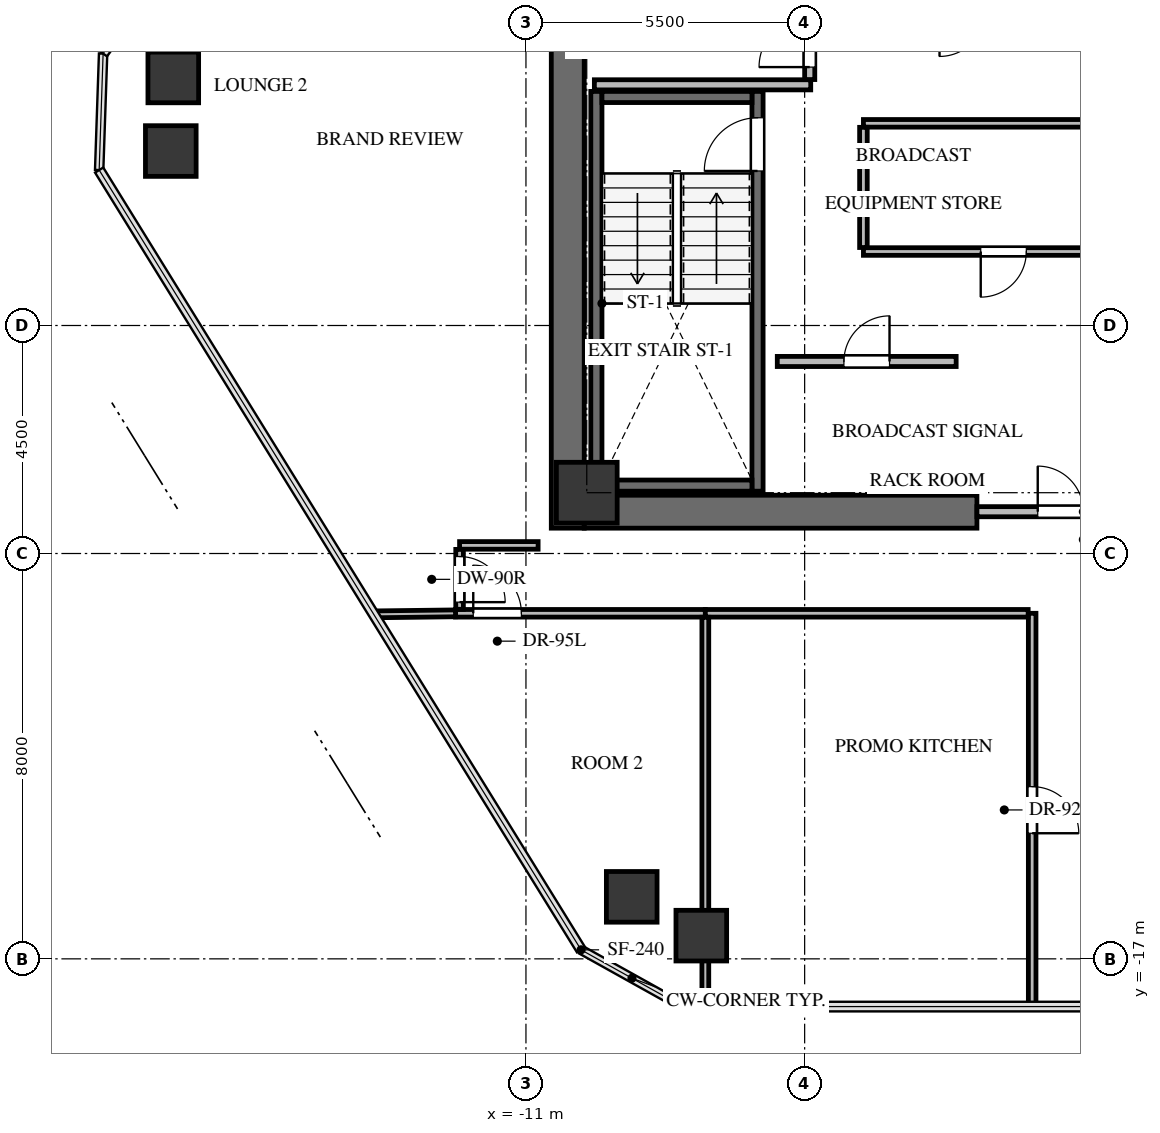
"""IFC4 building model, lengths in metres.
Left out: names, types, materials, properties, quantities, classifications, styles, units other than length and angle.
Written with IfcOpenShell. Run it as: python <this file> out.ifc"""

import sys

from ifc_helpers import new_model, si_unit, direction, frame, frame_2d, origin, origin_2d, place, context, subcontext, project, spatial, rectangle, extrude, source, transform, mapped, element, fill, save


model = new_model("IFC4")
c1 = context("Model", 3, precision=1e-05, world=origin(), true_north=direction((0.0, 1.0)))
c2 = subcontext(c1, "Body", "Model", "MODEL_VIEW")
j1 = project(units=[si_unit("LENGTHUNIT", "METRE"), si_unit("PLANEANGLEUNIT", "RADIAN")], contexts=[c1])
p1 = place(None, origin())
s1 = spatial("IfcSite", under=j1, at=p1, CompositionType="ELEMENT")
p2 = place(p1, origin())
s2 = spatial("IfcBuilding", under=s1, at=p2, CompositionType="ELEMENT")
p3 = place(p2, frame((0.0, 0.0, 196.9)))
s3 = spatial("IfcBuildingStorey", under=s2, at=p3, CompositionType="ELEMENT", Elevation=196.9)
p4 = place(p3, frame((-10.175, -8.5, 0.0), z_axis=(0.0, 0.0, 1.0), x_axis=(0.0, 1.0, 0.0)))
e1 = element("IfcWall", 1, at=p4, inside=s3, PredefinedType="SHEAR", context=c2, shape_type="SweptSolid", body=[
    extrude(rectangle(XDim=17.0, YDim=0.65, at=frame_2d((8.5, 0.0))), origin(), (0.0, 0.0, 1.0), 3.3),
])
p5 = place(p3, frame((-9.85, -8.175, 0.0), z_axis=(0.0, 0.0, 1.0), x_axis=(1.0, 0.0, 0.0)))
e2 = element("IfcWall", 2, at=p5, inside=s3, PredefinedType="SHEAR", context=c2, shape_type="SweptSolid", body=[
    extrude(rectangle(XDim=7.75, YDim=0.65, at=frame_2d((3.875, 0.0))), origin(), (0.0, 0.0, 1.0), 3.3),
])
p6 = place(p3, frame((-6.43, -7.77, -0.24), z_axis=(0.0, 0.0, 1.0), x_axis=(0.0, 1.0, 0.0)))
e3 = element("IfcWall", 3, at=p6, inside=s3, PredefinedType="SHEAR", context=c2, shape_type="SweptSolid", body=[
    extrude(rectangle(XDim=7.89, YDim=0.22, at=frame_2d((3.945, 0.0))), origin(), (0.0, 0.0, 1.0), 3.3),
])
p7 = place(p6, frame((6.32, 0.0, 0.0)))
e4 = element("IfcOpeningElement", 4, at=p7, cuts=e3, PredefinedType="OPENING", context=c2, shape_type="SweptSolid", body=[
    extrude(rectangle(XDim=1.05, YDim=2.15, at=frame_2d((0.525, 1.075))), frame((0.0, 0.12, 0.0), z_axis=(0.0, -1.0, 0.0), x_axis=(1.0, 0.0, 0.0)), (0.0, 0.0, 1.0), 0.24),
])
p8 = place(p3, frame((-9.61, 0.12, -0.24), z_axis=(0.0, 0.0, 1.0), x_axis=(0.0, -1.0, 0.0)))
e5 = element("IfcWall", 5, at=p8, inside=s3, PredefinedType="SHEAR", context=c2, shape_type="SweptSolid", body=[
    extrude(rectangle(XDim=7.89, YDim=0.22, at=frame_2d((3.945, 0.0))), origin(), (0.0, 0.0, 1.0), 3.3),
])
for number, where, z_axis, x_axis in (
    (6, (-9.5, -7.66, -0.24), (0.0, 0.0, 1.0), (1.0, 0.0, 0.0)),
    (7, (-6.54, 0.01, -0.24), (0.0, 0.0, 1.0), (-1.0, 0.0, 0.0)),
):
    element("IfcWall", number, at=place(p3, frame(where, z_axis=z_axis, x_axis=x_axis)), inside=s3, PredefinedType="SHEAR", context=c2, shape_type="SweptSolid", body=[
        extrude(rectangle(XDim=2.96, YDim=0.22, at=frame_2d((1.48, 0.0))), origin(), (0.0, 0.0, 1.0), 3.3),
    ])
m1 = source(origin(), c2, "Body", "SweptSolid", [
    extrude(rectangle(XDim=1.2, YDim=1.2, at=origin_2d()), origin(), (0.0, 0.0, 1.0), 3.3),
])
p9 = place(p3, frame((-9.8, -7.8, -0.24), z_axis=(0.0, 0.0, 1.0), x_axis=(1.0, 0.0, 0.0)))
e8 = element("IfcColumn", 8, at=p9, inside=s3, PredefinedType="COLUMN", context=c2, shape_type="MappedRepresentation", body=[
    mapped(m1, transform((0.0, 0.0, 0.0), x_axis=(1.0, 0.0, 0.0), y_axis=(0.0, 1.0, 0.0), z_axis=(0.0, 0.0, 1.0), scale=1.0)),
])
m2 = source(origin(), c2, "Body", "SweptSolid", [
    extrude(rectangle(XDim=1.0, YDim=1.0, at=origin_2d()), origin(), (0.0, 0.0, 1.0), 3.3),
])
for number, where, z_axis, x_axis in (
    (9, (-8.913, -15.776, -0.24), (0.0, 0.0, 1.0), (1.0, 0.0, 0.0)),
    (10, (-18.009, -1.057, -0.24), (0.0, 0.0, 1.0), (1.0, 0.0, 0.0)),
    (11, (-17.96, 0.396, -0.24), (0.0, 0.0, 1.0), (1.0, 0.0, 0.0)),
    (12, (-7.54, -16.542, -0.24), (0.0, 0.0, 1.0), (1.0, 0.0, 0.0)),
):
    element("IfcColumn", number, at=place(p3, frame(where, z_axis=z_axis, x_axis=x_axis)), inside=s3, PredefinedType="COLUMN", context=c2, shape_type="MappedRepresentation", body=[
        mapped(m2, transform((0.0, 0.0, 0.0), x_axis=(1.0, 0.0, 0.0), y_axis=(0.0, 1.0, 0.0), z_axis=(0.0, 0.0, 1.0), scale=1.0)),
    ])
p10 = place(p3, frame((-2.1, -8.175, 0.0), z_axis=(0.0, 0.0, 1.0), x_axis=(1.0, 0.0, 0.0)))
e13 = element("IfcWall", 13, at=p10, inside=s3, PredefinedType="SOLIDWALL", context=c2, shape_type="SweptSolid", body=[
    extrude(rectangle(XDim=4.2, YDim=0.2, at=frame_2d((2.1, 0.0))), origin(), (0.0, 0.0, 1.0), 3.045),
])
p11 = place(p10, frame((1.2, 0.0, 0.0)))
e14 = element("IfcOpeningElement", 14, at=p11, cuts=e13, PredefinedType="OPENING", context=c2, shape_type="SweptSolid", body=[
    extrude(rectangle(XDim=1.8, YDim=2.15, at=frame_2d((0.9, 1.075))), frame((0.0, 0.11, 0.0), z_axis=(0.0, -1.0, 0.0), x_axis=(1.0, 0.0, 0.0)), (0.0, 0.0, 1.0), 0.22),
])
p12 = place(p3, frame((-9.65, 0.25, 0.0), z_axis=(0.0, 0.0, 1.0), x_axis=(1.0, 0.0, 0.0)))
e15 = element("IfcWall", 15, at=p12, inside=s3, PredefinedType="SOLIDWALL", context=c2, shape_type="SweptSolid", body=[
    extrude(rectangle(XDim=4.27, YDim=0.2, at=frame_2d((2.135, 0.0))), origin(), (0.0, 0.0, 1.0), 3.045),
])
p13 = place(p3, frame((-5.4, 0.354, 0.0), z_axis=(0.0, 0.0, 1.0), x_axis=(0.0, 1.0, 0.0)))
e16 = element("IfcWall", 16, at=p13, inside=s3, PredefinedType="SOLIDWALL", context=c2, shape_type="SweptSolid", body=[
    extrude(rectangle(XDim=4.026, YDim=0.2, at=frame_2d((2.013, 0.0))), origin(), (0.0, 0.0, 1.0), 3.045),
])
p14 = place(p13, frame((0.246, 0.0, 0.0)))
e17 = element("IfcOpeningElement", 17, at=p14, cuts=e16, PredefinedType="OPENING", context=c2, shape_type="SweptSolid", body=[
    extrude(rectangle(XDim=1.0, YDim=2.15, at=frame_2d((0.5, 1.075))), frame((0.0, 0.11, 0.0), z_axis=(0.0, -1.0, 0.0), x_axis=(1.0, 0.0, 0.0)), (0.0, 0.0, 1.0), 0.22),
])
p15 = place(p3, frame((-6.04, -5.21, 0.0), z_axis=(0.0, 0.0, 1.0), x_axis=(1.0, 0.0, 0.0)))
e18 = element("IfcWall", 18, at=p15, inside=s3, PredefinedType="SOLIDWALL", context=c2, shape_type="SweptSolid", body=[
    extrude(rectangle(XDim=3.53, YDim=0.2, at=frame_2d((1.765, 0.0))), origin(), (0.0, 0.0, 1.0), 3.045),
])
p16 = place(p15, frame((1.315, 0.0, 0.0)))
e19 = element("IfcOpeningElement", 19, at=p16, cuts=e18, PredefinedType="OPENING", context=c2, shape_type="SweptSolid", body=[
    extrude(rectangle(XDim=0.9, YDim=2.05, at=frame_2d((0.45, 1.025))), frame((0.0, 0.11, 0.0), z_axis=(0.0, -1.0, 0.0), x_axis=(1.0, 0.0, 0.0)), (0.0, 0.0, 1.0), 0.22),
])
p17 = place(p3, frame((1.19, -3.04, 0.0), z_axis=(0.0, 0.0, 1.0), x_axis=(-1.0, 0.0, 0.0)))
e20 = element("IfcWall", 20, at=p17, inside=s3, PredefinedType="PARTITIONING", context=c2, shape_type="SweptSolid", body=[
    extrude(rectangle(XDim=5.53, YDim=0.15, at=frame_2d((2.765, 0.0))), origin(), (0.0, 0.0, 1.0), 3.045),
])
p18 = place(p17, frame((2.315, 0.0, 0.0)))
e21 = element("IfcOpeningElement", 21, at=p18, cuts=e20, PredefinedType="OPENING", context=c2, shape_type="SweptSolid", body=[
    extrude(rectangle(XDim=0.9, YDim=2.05, at=frame_2d((0.45, 1.025))), frame((0.0, 0.085, 0.0), z_axis=(0.0, -1.0, 0.0), x_axis=(1.0, 0.0, 0.0)), (0.0, 0.0, 1.0), 0.17),
])
p19 = place(p3, frame((-4.34, -0.51, 0.0), z_axis=(0.0, 0.0, 1.0), x_axis=(1.0, 0.0, 0.0)))
e22 = element("IfcWall", 22, at=p19, inside=s3, PredefinedType="PARTITIONING", context=c2, shape_type="SweptSolid", body=[
    extrude(rectangle(XDim=5.53, YDim=0.15, at=frame_2d((2.765, 0.0))), origin(), (0.0, 0.0, 1.0), 3.045),
])
p20 = place(p3, frame((-4.34, -2.961, 0.0), z_axis=(0.0, 0.0, 1.0), x_axis=(0.0, 1.0, 0.0)))
e23 = element("IfcWall", 23, at=p20, inside=s3, PredefinedType="PARTITIONING", context=c2, shape_type="SweptSolid", body=[
    extrude(rectangle(XDim=2.372, YDim=0.15, at=frame_2d((1.186, 0.0))), origin(), (0.0, 0.0, 1.0), 3.045),
])
p21 = place(p3, frame((-12.39, -10.18, 0.0), z_axis=(0.0, 0.0, 1.0), x_axis=(1.0, 0.0, 0.0)))
e24 = element("IfcWall", 24, at=p21, inside=s3, PredefinedType="PARTITIONING", context=c2, shape_type="SweptSolid", body=[
    extrude(rectangle(XDim=4.93, YDim=0.15, at=frame_2d((2.465, 0.0))), origin(), (0.0, 0.0, 1.0), 2.399),
])
p22 = place(p21, frame((0.35, 0.0, 0.0)))
e25 = element("IfcOpeningElement", 25, at=p22, cuts=e24, PredefinedType="OPENING", context=c2, shape_type="SweptSolid", body=[
    extrude(rectangle(XDim=0.95, YDim=2.1, at=frame_2d((0.475, 1.05))), frame((0.0, 0.085, 0.0), z_axis=(0.0, -1.0, 0.0), x_axis=(1.0, 0.0, 0.0)), (0.0, 0.0, 1.0), 0.17),
])
p23 = place(p3, frame((-1.01, -10.18, 0.0), z_axis=(0.0, 0.0, 1.0), x_axis=(0.0, -1.0, 0.0)))
e26 = element("IfcWall", 26, at=p23, inside=s3, PredefinedType="PARTITIONING", context=c2, shape_type="SweptSolid", body=[
    extrude(rectangle(XDim=7.762, YDim=0.15, at=frame_2d((3.881, 0.0))), origin(), (0.0, 0.0, 1.0), 2.399),
])
p24 = place(p23, frame((3.421, 0.0, 0.0)))
e27 = element("IfcOpeningElement", 27, at=p24, cuts=e26, PredefinedType="OPENING", context=c2, shape_type="SweptSolid", body=[
    extrude(rectangle(XDim=0.92, YDim=2.1, at=frame_2d((0.46, 1.05))), frame((0.0, 0.085, 0.0), z_axis=(0.0, -1.0, 0.0), x_axis=(1.0, 0.0, 0.0)), (0.0, 0.0, 1.0), 0.17),
])
p25 = place(p3, frame((-7.46, -10.18, 0.0), z_axis=(0.0, 0.0, 1.0), x_axis=(1.0, 0.0, 0.0)))
e28 = element("IfcWall", 28, at=p25, inside=s3, PredefinedType="PARTITIONING", context=c2, shape_type="SweptSolid", body=[
    extrude(rectangle(XDim=6.371, YDim=0.15, at=frame_2d((3.186, 0.0))), origin(), (0.0, 0.0, 1.0), 2.242),
])
p26 = place(p3, frame((-10.76, -8.84, 0.0), z_axis=(0.0, 0.0, 1.0), x_axis=(-1.0, 0.0, 0.0)))
e29 = element("IfcWall", 29, at=p26, inside=s3, PredefinedType="PARTITIONING", context=c2, shape_type="SweptSolid", body=[
    extrude(rectangle(XDim=1.55, YDim=0.15, at=frame_2d((0.775, 0.0))), origin(), (0.0, 0.0, 1.0), 3.045),
])
p27 = place(p3, frame((-12.31, -8.919, 0.0), z_axis=(0.0, 0.0, 1.0), x_axis=(0.0, -1.0, 0.0)))
e30 = element("IfcWall", 30, at=p27, inside=s3, PredefinedType="PARTITIONING", context=c2, shape_type="SweptSolid", body=[
    extrude(rectangle(XDim=1.182, YDim=0.15, at=frame_2d((0.591, 0.0))), origin(), (0.0, 0.0, 1.0), 2.399),
])
p28 = place(p27, frame((0.141, 0.0, 0.0)))
e31 = element("IfcOpeningElement", 31, at=p28, cuts=e30, PredefinedType="OPENING", context=c2, shape_type="SweptSolid", body=[
    extrude(rectangle(XDim=0.9, YDim=2.05, at=frame_2d((0.45, 1.025))), frame((0.0, 0.085, 0.0), z_axis=(0.0, -1.0, 0.0), x_axis=(1.0, 0.0, 0.0)), (0.0, 0.0, 1.0), 0.17),
])
p29 = place(p3, frame((-7.46, -10.259, 0.0), z_axis=(0.0, 0.0, 1.0), x_axis=(0.0, -1.0, 0.0)))
e32 = element("IfcWall", 32, at=p29, inside=s3, PredefinedType="PARTITIONING", context=c2, shape_type="SweptSolid", body=[
    extrude(rectangle(XDim=6.367, YDim=0.135, at=frame_2d((3.184, 0.0))), origin(), (0.0, 0.0, 1.0), 2.242),
])
p30 = place(p3, frame((-7.46, -16.626, 0.0), z_axis=(0.0, 0.0, 1.0), x_axis=(0.0, -1.0, 0.0)))
e33 = element("IfcWall", 33, at=p30, inside=s3, PredefinedType="PARTITIONING", context=c2, shape_type="SweptSolid", body=[
    extrude(rectangle(XDim=1.316, YDim=0.135, at=frame_2d((0.658, 0.0))), origin(), (0.0, 0.0, 1.0), 1.877),
])
p31 = place(p3, frame((-14.004, -10.201, 0.0), z_axis=(0.0, 0.0, 1.0), x_axis=(0.999923084603, 0.012402615782, 0.0)))
e34 = element("IfcWall", 34, at=p31, inside=s3, PredefinedType="PARTITIONING", context=c2, shape_type="SweptSolid", body=[
    extrude(rectangle(XDim=1.614, YDim=0.135, at=frame_2d((0.807, 0.0))), origin(), (0.0, 0.0, 1.0), 2.399),
])
m3 = source(origin(), c2, "Body", "SweptSolid", [
    extrude(rectangle(XDim=1.05, YDim=2.15, at=frame_2d((0.525, 1.075))), frame((0.0, 0.025, 0.0), z_axis=(0.0, -1.0, 0.0), x_axis=(1.0, 0.0, 0.0)), (0.0, 0.0, 1.0), 0.05),
])
p32 = place(p7, origin())
e35 = element("IfcDoor", 35, at=p32, inside=s3, OperationType="SINGLE_SWING_LEFT", PredefinedType="DOOR", context=c2, shape_type="MappedRepresentation", body=[
    mapped(m3, transform((0.0, 0.0, 0.0), x_axis=(1.0, 0.0, 0.0), y_axis=(0.0, 1.0, 0.0), z_axis=(0.0, 0.0, 1.0), scale=1.0)),
])
fill(e4, e35)
m4 = source(origin(), c2, "Body", "SweptSolid", [
    extrude(rectangle(XDim=1.8, YDim=2.15, at=frame_2d((0.9, 1.075))), frame((0.0, 0.025, 0.0), z_axis=(0.0, -1.0, 0.0), x_axis=(1.0, 0.0, 0.0)), (0.0, 0.0, 1.0), 0.05),
])
p33 = place(p11, origin())
e36 = element("IfcDoor", 36, at=p33, inside=s3, OperationType="DOUBLE_DOOR_SINGLE_SWING", PredefinedType="DOOR", context=c2, shape_type="MappedRepresentation", body=[
    mapped(m4, transform((0.0, 0.0, 0.0), x_axis=(1.0, 0.0, 0.0), y_axis=(0.0, 1.0, 0.0), z_axis=(0.0, 0.0, 1.0), scale=1.0)),
])
fill(e14, e36)
m5 = source(origin(), c2, "Body", "SweptSolid", [
    extrude(rectangle(XDim=1.0, YDim=2.15, at=frame_2d((0.5, 1.075))), frame((0.0, 0.025, 0.0), z_axis=(0.0, -1.0, 0.0), x_axis=(1.0, 0.0, 0.0)), (0.0, 0.0, 1.0), 0.05),
])
p34 = place(p14, origin())
e37 = element("IfcDoor", 37, at=p34, inside=s3, OperationType="SINGLE_SWING_LEFT", PredefinedType="DOOR", context=c2, shape_type="MappedRepresentation", body=[
    mapped(m5, transform((0.0, 0.0, 0.0), x_axis=(1.0, 0.0, 0.0), y_axis=(0.0, 1.0, 0.0), z_axis=(0.0, 0.0, 1.0), scale=1.0)),
])
fill(e17, e37)
m6 = source(origin(), c2, "Body", "SweptSolid", [
    extrude(rectangle(XDim=0.9, YDim=2.05, at=frame_2d((0.45, 1.025))), frame((0.0, 0.025, 0.0), z_axis=(0.0, -1.0, 0.0), x_axis=(1.0, 0.0, 0.0)), (0.0, 0.0, 1.0), 0.05),
])
p35 = place(p16, origin())
e38 = element("IfcDoor", 38, at=p35, inside=s3, OperationType="SINGLE_SWING_RIGHT", PredefinedType="DOOR", context=c2, shape_type="MappedRepresentation", body=[
    mapped(m6, transform((0.0, 0.0, 0.0), x_axis=(1.0, 0.0, 0.0), y_axis=(0.0, 1.0, 0.0), z_axis=(0.0, 0.0, 1.0), scale=1.0)),
])
fill(e19, e38)
p36 = place(p18, origin())
e39 = element("IfcDoor", 39, at=p36, inside=s3, OperationType="SINGLE_SWING_RIGHT", PredefinedType="DOOR", context=c2, shape_type="MappedRepresentation", body=[
    mapped(m6, transform((0.0, 0.0, 0.0), x_axis=(1.0, 0.0, 0.0), y_axis=(0.0, 1.0, 0.0), z_axis=(0.0, 0.0, 1.0), scale=1.0)),
])
fill(e21, e39)
m7 = source(origin(), c2, "Body", "SweptSolid", [
    extrude(rectangle(XDim=0.95, YDim=2.1, at=frame_2d((0.475, 1.05))), frame((0.0, 0.025, 0.0), z_axis=(0.0, -1.0, 0.0), x_axis=(1.0, 0.0, 0.0)), (0.0, 0.0, 1.0), 0.05),
])
p37 = place(p22, origin())
e40 = element("IfcDoor", 40, at=p37, inside=s3, OperationType="SINGLE_SWING_LEFT", PredefinedType="DOOR", context=c2, shape_type="MappedRepresentation", body=[
    mapped(m7, transform((0.0, 0.0, 0.0), x_axis=(1.0, 0.0, 0.0), y_axis=(0.0, 1.0, 0.0), z_axis=(0.0, 0.0, 1.0), scale=1.0)),
])
fill(e25, e40)
m8 = source(origin(), c2, "Body", "SweptSolid", [
    extrude(rectangle(XDim=0.92, YDim=2.1, at=frame_2d((0.46, 1.05))), frame((0.0, 0.025, 0.0), z_axis=(0.0, -1.0, 0.0), x_axis=(1.0, 0.0, 0.0)), (0.0, 0.0, 1.0), 0.05),
])
p38 = place(p24, origin())
e41 = element("IfcDoor", 41, at=p38, inside=s3, OperationType="SINGLE_SWING_RIGHT", PredefinedType="DOOR", context=c2, shape_type="MappedRepresentation", body=[
    mapped(m8, transform((0.0, 0.0, 0.0), x_axis=(1.0, 0.0, 0.0), y_axis=(0.0, 1.0, 0.0), z_axis=(0.0, 0.0, 1.0), scale=1.0)),
])
fill(e27, e41)
m9 = source(origin(), c2, "Body", "SweptSolid", [
    extrude(rectangle(XDim=0.9, YDim=2.05, at=frame_2d((0.45, 1.025))), frame((0.0, 0.025, 0.0), z_axis=(0.0, -1.0, 0.0), x_axis=(1.0, 0.0, 0.0)), (0.0, 0.0, 1.0), 0.05),
])
p39 = place(p28, origin())
e42 = element("IfcDoor", 42, at=p39, inside=s3, OperationType="SINGLE_SWING_RIGHT", PredefinedType="DOOR", context=c2, shape_type="MappedRepresentation", body=[
    mapped(m9, transform((0.0, 0.0, 0.0), x_axis=(1.0, 0.0, 0.0), y_axis=(0.0, 1.0, 0.0), z_axis=(0.0, 0.0, 1.0), scale=1.0)),
])
fill(e31, e42)
save(model, sys.argv[1])
